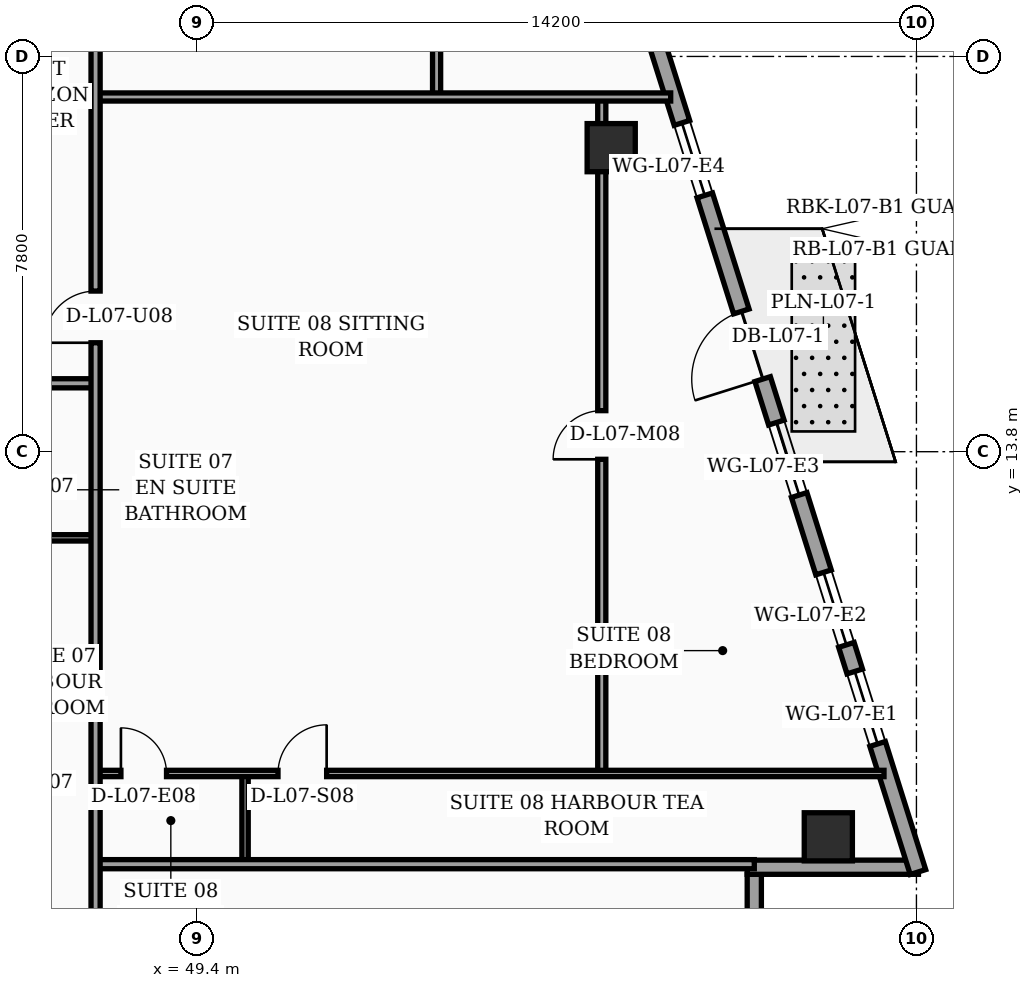
"""IFC4 building model, lengths in metres.
Left out: names, types, materials, properties, quantities, classifications, styles, units other than length and angle.
Written with IfcOpenShell. Run it as: python <this file> out.ifc"""

import sys

from ifc_helpers import new_model, si_unit, direction, frame, frame_2d, origin, origin_2d, place, context, subcontext, project, spatial, rectangle, hollow_rectangle, extrude, element, fill, save


model = new_model("IFC4")
c1 = context("Model", 3, precision=1e-05, world=origin(), true_north=direction((0.0, 1.0)))
c2 = subcontext(c1, "Body", "Model", "MODEL_VIEW")
j1 = project(units=[si_unit("LENGTHUNIT", "METRE"), si_unit("PLANEANGLEUNIT", "RADIAN")], contexts=[c1])
p1 = place(None, origin())
s1 = spatial("IfcSite", under=j1, at=p1, CompositionType="ELEMENT")
p2 = place(p1, origin())
s2 = spatial("IfcBuilding", under=s1, at=p2, CompositionType="ELEMENT")
p3 = place(p2, frame((0.0, 0.0, 34.6)))
s3 = spatial("IfcBuildingStorey", under=s2, at=p3, CompositionType="ELEMENT", Elevation=34.6)
for number, where, z_axis, x_axis in (
    (1, (61.861, 6.2, 0.0), (0.0, 0.0, 1.0), (1.0, 0.0, 0.0)),
    (2, (57.576, 19.8, 0.0), (0.0, 0.0, 1.0), (1.0, 0.0, 0.0)),
):
    element("IfcColumn", number, at=place(p3, frame(where, z_axis=z_axis, x_axis=x_axis)), inside=s3, PredefinedType="COLUMN", context=c2, shape_type="SweptSolid", body=[
        extrude(hollow_rectangle(XDim=0.95, YDim=0.95, WallThickness=0.04, at=origin_2d()), origin(), (0.0, 0.0, 1.0), 3.56),
    ])
p4 = place(p3, frame((60.4, 2.52, 0.0), z_axis=(0.0, 0.0, 1.0), x_axis=(0.0, 1.0, 0.0)))
e3 = element("IfcWall", 3, at=p4, inside=s3, PredefinedType="SOLIDWALL", context=c2, shape_type="SweptSolid", body=[
    extrude(rectangle(XDim=2.94, YDim=0.28, at=frame_2d((1.47, 0.0))), origin(), (0.0, 0.0, 1.0), 3.04),
])
p5 = place(p3, frame((60.26, 5.6, 0.0), z_axis=(0.0, 0.0, 1.0), x_axis=(1.0, 0.0, 0.0)))
e4 = element("IfcWall", 4, at=p5, inside=s3, PredefinedType="SOLIDWALL", context=c2, shape_type="SweptSolid", body=[
    extrude(rectangle(XDim=3.38, YDim=0.28, at=frame_2d((1.69, 0.0))), origin(), (0.0, 0.0, 1.0), 3.04),
])
p6 = place(p3, frame((63.63, 5.505, 0.0), z_axis=(0.0, 0.0, 1.0), x_axis=(-0.300501856448, 0.953781229775, 0.0)))
e5 = element("IfcWall", 5, at=p6, inside=s3, PredefinedType="SOLIDWALL", context=c2, shape_type="SweptSolid", body=[
    extrude(rectangle(XDim=30.814, YDim=0.32, at=frame_2d((15.407, 0.0))), origin(), (0.0, 0.0, 1.0), 3.56),
])
p7 = place(p6, frame((10.199, 0.0, 0.0)))
e6 = element("IfcOpeningElement", 6, at=p7, cuts=e5, PredefinedType="OPENING", context=c2, shape_type="SweptSolid", body=[
    extrude(rectangle(XDim=1.4, YDim=2.25, at=frame_2d((0.7, 1.125))), frame((0.0, 0.17, 0.0), z_axis=(0.0, -1.0, 0.0), x_axis=(1.0, 0.0, 0.0)), (0.0, 0.0, 1.0), 0.34),
])
p8 = place(p6, frame((2.65, 0.0, 0.75)))
e7 = element("IfcOpeningElement", 7, at=p8, cuts=e5, PredefinedType="OPENING", context=c2, shape_type="SweptSolid", body=[
    extrude(rectangle(XDim=1.5, YDim=1.6, at=frame_2d((0.75, 0.8))), frame((0.0, 0.17, 0.0), z_axis=(0.0, -1.0, 0.0), x_axis=(1.0, 0.0, 0.0)), (0.0, 0.0, 1.0), 0.34),
])
p9 = place(p6, frame((4.7, 0.0, 0.75)))
e8 = element("IfcOpeningElement", 8, at=p9, cuts=e5, PredefinedType="OPENING", context=c2, shape_type="SweptSolid", body=[
    extrude(rectangle(XDim=1.5, YDim=1.6, at=frame_2d((0.75, 0.8))), frame((0.0, 0.17, 0.0), z_axis=(0.0, -1.0, 0.0), x_axis=(1.0, 0.0, 0.0)), (0.0, 0.0, 1.0), 0.34),
])
p10 = place(p6, frame((7.8, 0.0, 0.75)))
e9 = element("IfcOpeningElement", 9, at=p10, cuts=e5, PredefinedType="OPENING", context=c2, shape_type="SweptSolid", body=[
    extrude(rectangle(XDim=1.5, YDim=1.6, at=frame_2d((0.75, 0.8))), frame((0.0, 0.17, 0.0), z_axis=(0.0, -1.0, 0.0), x_axis=(1.0, 0.0, 0.0)), (0.0, 0.0, 1.0), 0.34),
])
p11 = place(p6, frame((14.0, 0.0, 0.75)))
e10 = element("IfcOpeningElement", 10, at=p11, cuts=e5, PredefinedType="OPENING", context=c2, shape_type="SweptSolid", body=[
    extrude(rectangle(XDim=1.5, YDim=1.6, at=frame_2d((0.75, 0.8))), frame((0.0, 0.17, 0.0), z_axis=(0.0, -1.0, 0.0), x_axis=(1.0, 0.0, 0.0)), (0.0, 0.0, 1.0), 0.34),
])
p12 = place(p6, frame((17.1, 0.0, 0.75)))
e11 = element("IfcOpeningElement", 11, at=p12, cuts=e5, PredefinedType="OPENING", context=c2, shape_type="SweptSolid", body=[
    extrude(rectangle(XDim=1.5, YDim=1.6, at=frame_2d((0.75, 0.8))), frame((0.0, 0.17, 0.0), z_axis=(0.0, -1.0, 0.0), x_axis=(1.0, 0.0, 0.0)), (0.0, 0.0, 1.0), 0.34),
])
p13 = place(p6, frame((20.2, 0.0, 0.75)))
e12 = element("IfcOpeningElement", 12, at=p13, cuts=e5, PredefinedType="OPENING", context=c2, shape_type="SweptSolid", body=[
    extrude(rectangle(XDim=1.5, YDim=1.6, at=frame_2d((0.75, 0.8))), frame((0.0, 0.17, 0.0), z_axis=(0.0, -1.0, 0.0), x_axis=(1.0, 0.0, 0.0)), (0.0, 0.0, 1.0), 0.34),
])
p14 = place(p6, frame((26.4, 0.0, 0.75)))
e13 = element("IfcOpeningElement", 13, at=p14, cuts=e5, PredefinedType="OPENING", context=c2, shape_type="SweptSolid", body=[
    extrude(rectangle(XDim=1.5, YDim=1.6, at=frame_2d((0.75, 0.8))), frame((0.0, 0.17, 0.0), z_axis=(0.0, -1.0, 0.0), x_axis=(1.0, 0.0, 0.0)), (0.0, 0.0, 1.0), 0.34),
])
p15 = place(p3, frame((45.47, 12.1, 0.0), z_axis=(0.0, 0.0, 1.0), x_axis=(1.0, 0.0, 0.0)))
e14 = element("IfcWall", 14, at=p15, inside=s3, PredefinedType="PARTITIONING", context=c2, shape_type="SweptSolid", body=[
    extrude(rectangle(XDim=1.93, YDim=0.125, at=frame_2d((0.965, 0.0))), origin(), (0.0, 0.0, 1.0), 2.84),
])
p16 = place(p3, frame((32.4, 15.15, 0.0), z_axis=(0.0, 0.0, 1.0), x_axis=(1.0, 0.0, 0.0)))
e15 = element("IfcWall", 15, at=p16, inside=s3, PredefinedType="PARTITIONING", context=c2, shape_type="SweptSolid", body=[
    extrude(rectangle(XDim=15.0, YDim=0.18, at=frame_2d((7.5, 0.0))), origin(), (0.0, 0.0, 1.0), 2.84),
])
p17 = place(p16, frame((2.95, 0.0, 0.0)))
e16 = element("IfcOpeningElement", 16, at=p17, cuts=e15, PredefinedType="OPENING", context=c2, shape_type="SweptSolid", body=[
    extrude(rectangle(XDim=1.02, YDim=2.2, at=frame_2d((0.51, 1.1))), frame((0.0, 0.1, 0.0), z_axis=(0.0, -1.0, 0.0), x_axis=(1.0, 0.0, 0.0)), (0.0, 0.0, 1.0), 0.2),
])
p18 = place(p16, frame((10.45, 0.0, 0.0)))
e17 = element("IfcOpeningElement", 17, at=p18, cuts=e15, PredefinedType="OPENING", context=c2, shape_type="SweptSolid", body=[
    extrude(rectangle(XDim=1.02, YDim=2.2, at=frame_2d((0.51, 1.1))), frame((0.0, 0.1, 0.0), z_axis=(0.0, -1.0, 0.0), x_axis=(1.0, 0.0, 0.0)), (0.0, 0.0, 1.0), 0.2),
])
p19 = place(p3, frame((50.35, 5.66, 0.0), z_axis=(0.0, 0.0, 1.0), x_axis=(0.0, 1.0, 0.0)))
e18 = element("IfcWall", 18, at=p19, inside=s3, PredefinedType="PARTITIONING", context=c2, shape_type="SweptSolid", body=[
    extrude(rectangle(XDim=1.79, YDim=0.125, at=frame_2d((0.895, 0.0))), origin(), (0.0, 0.0, 1.0), 3.56),
])
p20 = place(p3, frame((57.39, 7.45, 0.0), z_axis=(0.0, 0.0, 1.0), x_axis=(0.0, 1.0, 0.0)))
e19 = element("IfcWall", 19, at=p20, inside=s3, PredefinedType="PARTITIONING", context=c2, shape_type="SweptSolid", body=[
    extrude(rectangle(XDim=13.35, YDim=0.16, at=frame_2d((6.675, 0.0))), origin(), (0.0, 0.0, 1.0), 2.84),
])
p21 = place(p20, frame((6.2, 0.0, 0.0)))
e20 = element("IfcOpeningElement", 20, at=p21, cuts=e19, PredefinedType="OPENING", context=c2, shape_type="SweptSolid", body=[
    extrude(rectangle(XDim=0.96, YDim=2.2, at=frame_2d((0.48, 1.1))), frame((0.0, 0.09, 0.0), z_axis=(0.0, -1.0, 0.0), x_axis=(1.0, 0.0, 0.0)), (0.0, 0.0, 1.0), 0.18),
])
p22 = place(p3, frame((47.4, 7.45, 0.0), z_axis=(0.0, 0.0, 1.0), x_axis=(1.0, 0.0, 0.0)))
e21 = element("IfcWall", 21, at=p22, inside=s3, PredefinedType="PARTITIONING", context=c2, shape_type="SweptSolid", body=[
    extrude(rectangle(XDim=15.56, YDim=0.125, at=frame_2d((7.78, 0.0))), origin(), (0.0, 0.0, 1.0), 2.84),
])
p23 = place(p22, frame((0.5, 0.0, 0.0)))
e22 = element("IfcOpeningElement", 22, at=p23, cuts=e21, PredefinedType="OPENING", context=c2, shape_type="SweptSolid", body=[
    extrude(rectangle(XDim=0.9, YDim=2.15, at=frame_2d((0.45, 1.075))), frame((0.0, 0.073, 0.0), z_axis=(0.0, -1.0, 0.0), x_axis=(1.0, 0.0, 0.0)), (0.0, 0.0, 1.0), 0.145),
])
p24 = place(p22, frame((3.6, 0.0, 0.0)))
e23 = element("IfcOpeningElement", 23, at=p24, cuts=e21, PredefinedType="OPENING", context=c2, shape_type="SweptSolid", body=[
    extrude(rectangle(XDim=0.96, YDim=2.2, at=frame_2d((0.48, 1.1))), frame((0.0, 0.073, 0.0), z_axis=(0.0, -1.0, 0.0), x_axis=(1.0, 0.0, 0.0)), (0.0, 0.0, 1.0), 0.145),
])
p25 = place(p3, frame((47.4, 5.66, 0.0), z_axis=(0.0, 0.0, 1.0), x_axis=(1.0, 0.0, 0.0)))
e24 = element("IfcWall", 24, at=p25, inside=s3, PredefinedType="PARTITIONING", context=c2, shape_type="SweptSolid", body=[
    extrude(rectangle(XDim=13.0, YDim=0.18, at=frame_2d((6.5, 0.0))), origin(), (0.0, 0.0, 1.0), 2.84),
])
p26 = place(p3, frame((54.13, 20.8, 0.0), z_axis=(0.0, 0.0, 1.0), x_axis=(0.0, 1.0, 0.0)))
e25 = element("IfcWall", 25, at=p26, inside=s3, PredefinedType="PARTITIONING", context=c2, shape_type="SweptSolid", body=[
    extrude(rectangle(XDim=7.35, YDim=0.16, at=frame_2d((3.675, 0.0))), origin(), (0.0, 0.0, 1.0), 3.19),
])
p27 = place(p26, frame((3.19, 0.0, 0.0)))
e26 = element("IfcOpeningElement", 26, at=p27, cuts=e25, PredefinedType="OPENING", context=c2, shape_type="SweptSolid", body=[
    extrude(rectangle(XDim=0.96, YDim=2.2, at=frame_2d((0.48, 1.1))), frame((0.0, 0.09, 0.0), z_axis=(0.0, -1.0, 0.0), x_axis=(1.0, 0.0, 0.0)), (0.0, 0.0, 1.0), 0.18),
])
p28 = place(p3, frame((47.4, 20.8, 0.0), z_axis=(0.0, 0.0, 1.0), x_axis=(1.0, 0.0, 0.0)))
e27 = element("IfcWall", 27, at=p28, inside=s3, PredefinedType="PARTITIONING", context=c2, shape_type="SweptSolid", body=[
    extrude(rectangle(XDim=11.35, YDim=0.16, at=frame_2d((5.675, 0.0))), origin(), (0.0, 0.0, 1.0), 3.04),
])
p29 = place(p3, frame((47.4, 2.44, 0.0), z_axis=(0.0, 0.0, 1.0), x_axis=(0.0, 1.0, 0.0)))
e28 = element("IfcWall", 28, at=p29, inside=s3, PredefinedType="PARTITIONING", context=c2, shape_type="SweptSolid", body=[
    extrude(rectangle(XDim=27.84, YDim=0.18, at=frame_2d((13.92, 0.0))), origin(), (0.0, 0.0, 1.0), 2.84),
])
p30 = place(p29, frame((13.51, 0.0, 0.0)))
e29 = element("IfcOpeningElement", 29, at=p30, cuts=e28, PredefinedType="OPENING", context=c2, shape_type="SweptSolid", body=[
    extrude(rectangle(XDim=1.02, YDim=2.2, at=frame_2d((0.51, 1.1))), frame((0.0, 0.1, 0.0), z_axis=(0.0, -1.0, 0.0), x_axis=(1.0, 0.0, 0.0)), (0.0, 0.0, 1.0), 0.2),
])
p31 = place(p29, frame((21.52, 0.0, 0.0)))
e30 = element("IfcOpeningElement", 30, at=p31, cuts=e28, PredefinedType="OPENING", context=c2, shape_type="SweptSolid", body=[
    extrude(rectangle(XDim=1.02, YDim=2.2, at=frame_2d((0.51, 1.1))), frame((0.0, 0.1, 0.0), z_axis=(0.0, -1.0, 0.0), x_axis=(1.0, 0.0, 0.0)), (0.0, 0.0, 1.0), 0.2),
])
p32 = place(p7, origin())
e31 = element("IfcDoor", 31, at=p32, inside=s3, OperationType="SINGLE_SWING_LEFT", PredefinedType="DOOR", context=c2, shape_type="SweptSolid", body=[
    extrude(rectangle(XDim=1.4, YDim=2.25, at=frame_2d((0.7, 1.125))), frame((0.0, 0.025, 0.0), z_axis=(0.0, -1.0, 0.0), x_axis=(1.0, 0.0, 0.0)), (0.0, 0.0, 1.0), 0.05),
])
fill(e6, e31)
p33 = place(p8, origin())
e32 = element("IfcWindow", 32, at=p33, inside=s3, PartitioningType="SINGLE_PANEL", PredefinedType="WINDOW", context=c2, shape_type="SweptSolid", body=[
    extrude(rectangle(XDim=1.5, YDim=1.6, at=frame_2d((0.75, 0.8))), frame((0.0, 0.03, 0.0), z_axis=(0.0, -1.0, 0.0), x_axis=(1.0, 0.0, 0.0)), (0.0, 0.0, 1.0), 0.06),
])
fill(e7, e32)
p34 = place(p9, origin())
e33 = element("IfcWindow", 33, at=p34, inside=s3, PartitioningType="SINGLE_PANEL", PredefinedType="WINDOW", context=c2, shape_type="SweptSolid", body=[
    extrude(rectangle(XDim=1.5, YDim=1.6, at=frame_2d((0.75, 0.8))), frame((0.0, 0.03, 0.0), z_axis=(0.0, -1.0, 0.0), x_axis=(1.0, 0.0, 0.0)), (0.0, 0.0, 1.0), 0.06),
])
fill(e8, e33)
p35 = place(p10, origin())
e34 = element("IfcWindow", 34, at=p35, inside=s3, PartitioningType="SINGLE_PANEL", PredefinedType="WINDOW", context=c2, shape_type="SweptSolid", body=[
    extrude(rectangle(XDim=1.5, YDim=1.6, at=frame_2d((0.75, 0.8))), frame((0.0, 0.03, 0.0), z_axis=(0.0, -1.0, 0.0), x_axis=(1.0, 0.0, 0.0)), (0.0, 0.0, 1.0), 0.06),
])
fill(e9, e34)
p36 = place(p11, origin())
e35 = element("IfcWindow", 35, at=p36, inside=s3, PartitioningType="SINGLE_PANEL", PredefinedType="WINDOW", context=c2, shape_type="SweptSolid", body=[
    extrude(rectangle(XDim=1.5, YDim=1.6, at=frame_2d((0.75, 0.8))), frame((0.0, 0.03, 0.0), z_axis=(0.0, -1.0, 0.0), x_axis=(1.0, 0.0, 0.0)), (0.0, 0.0, 1.0), 0.06),
])
fill(e10, e35)
p37 = place(p21, origin())
e36 = element("IfcDoor", 36, at=p37, inside=s3, OperationType="SINGLE_SWING_LEFT", PredefinedType="DOOR", context=c2, shape_type="SweptSolid", body=[
    extrude(rectangle(XDim=0.96, YDim=2.2, at=frame_2d((0.48, 1.1))), frame((0.0, 0.025, 0.0), z_axis=(0.0, -1.0, 0.0), x_axis=(1.0, 0.0, 0.0)), (0.0, 0.0, 1.0), 0.05),
])
fill(e20, e36)
p38 = place(p23, origin())
e37 = element("IfcDoor", 37, at=p38, inside=s3, OperationType="SINGLE_SWING_LEFT", PredefinedType="DOOR", context=c2, shape_type="SweptSolid", body=[
    extrude(rectangle(XDim=0.9, YDim=2.15, at=frame_2d((0.45, 1.075))), frame((0.0, 0.025, 0.0), z_axis=(0.0, -1.0, 0.0), x_axis=(1.0, 0.0, 0.0)), (0.0, 0.0, 1.0), 0.05),
])
fill(e22, e37)
p39 = place(p24, origin())
e38 = element("IfcDoor", 38, at=p39, inside=s3, OperationType="SINGLE_SWING_RIGHT", PredefinedType="DOOR", context=c2, shape_type="SweptSolid", body=[
    extrude(rectangle(XDim=0.96, YDim=2.2, at=frame_2d((0.48, 1.1))), frame((0.0, 0.025, 0.0), z_axis=(0.0, -1.0, 0.0), x_axis=(1.0, 0.0, 0.0)), (0.0, 0.0, 1.0), 0.05),
])
fill(e23, e38)
p40 = place(p30, origin())
e39 = element("IfcDoor", 39, at=p40, inside=s3, OperationType="SINGLE_SWING_LEFT", PredefinedType="DOOR", context=c2, shape_type="SweptSolid", body=[
    extrude(rectangle(XDim=1.02, YDim=2.2, at=frame_2d((0.51, 1.1))), frame((0.0, 0.025, 0.0), z_axis=(0.0, -1.0, 0.0), x_axis=(1.0, 0.0, 0.0)), (0.0, 0.0, 1.0), 0.05),
])
fill(e29, e39)
save(model, sys.argv[1])
